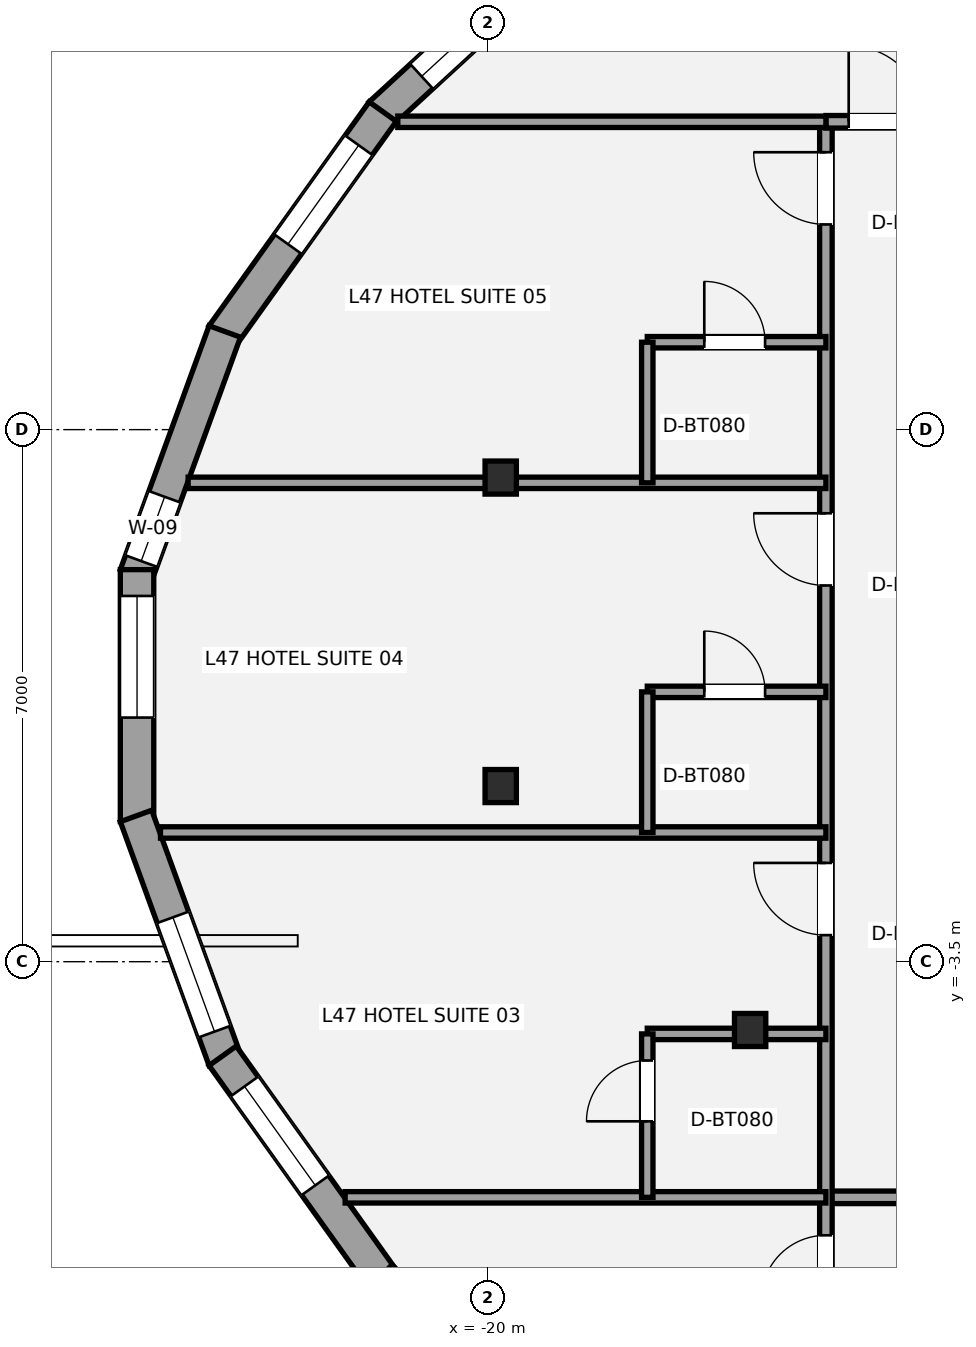
"""IFC4 building model, lengths in metres.
Left out: names, types, materials, properties, quantities, classifications, styles, units other than length and angle.
Written with IfcOpenShell. Run it as: python <this file> out.ifc"""

import sys

from ifc_helpers import new_model, si_unit, direction, frame, frame_2d, origin, origin_2d, place, context, subcontext, project, spatial, rectangle, i_section, extrude, element, fill, save


model = new_model("IFC4")
c1 = context("Model", 3, precision=1e-05, world=origin(), true_north=direction((0.0, 1.0)))
c2 = subcontext(c1, "Body", "Model", "MODEL_VIEW")
j1 = project(units=[si_unit("LENGTHUNIT", "METRE"), si_unit("PLANEANGLEUNIT", "RADIAN")], contexts=[c1])
p1 = place(None, origin())
s1 = spatial("IfcSite", under=j1, at=p1, CompositionType="ELEMENT")
p2 = place(p1, origin())
s2 = spatial("IfcBuilding", under=s1, at=p2, CompositionType="ELEMENT")
p3 = place(p2, frame((0.0, 0.0, 172.6)))
s3 = spatial("IfcBuildingStorey", under=s2, at=p3, CompositionType="ELEMENT", Elevation=172.6)
for number, where, z_axis, x_axis in (
    (1, (-19.828, 2.869, 0.0), (0.0, 0.0, 1.0), (1.0, 0.0, 0.0)),
    (2, (-19.828, -1.189, 0.0), (0.0, 0.0, 1.0), (1.0, 0.0, 0.0)),
    (3, (-16.547, -4.398, 0.0), (0.0, 0.0, 1.0), (1.0, 0.0, 0.0)),
):
    element("IfcColumn", number, at=place(p3, frame(where, z_axis=z_axis, x_axis=x_axis)), inside=s3, PredefinedType="COLUMN", context=c2, shape_type="SweptSolid", body=[
        extrude(i_section(OverallWidth=0.412, OverallDepth=0.435, WebThickness=0.036, FlangeThickness=0.057, at=origin_2d()), origin(), (0.0, 0.0, 1.0), 3.2),
    ])
p4 = place(p3, frame((-21.41, 7.65, 0.0), z_axis=(0.0, 0.0, 1.0), x_axis=(0.736282263947, 0.676674536093, 0.0)))
e4 = element("IfcWall", 4, at=p4, inside=s3, PredefinedType="STANDARD", context=c2, shape_type="SweptSolid", body=[
    extrude(rectangle(XDim=3.85, YDim=0.44, at=frame_2d((1.925, 0.0))), origin(), (0.0, 0.0, 1.0), 2.315),
])
p5 = place(p4, frame((0.736, 0.0, 0.58)))
e5 = element("IfcOpeningElement", 5, at=p5, cuts=e4, PredefinedType="OPENING", context=c2, shape_type="SweptSolid", body=[
    extrude(rectangle(XDim=1.6, YDim=1.55, at=frame_2d((0.8, 0.775))), frame((0.0, 0.23, 0.0), z_axis=(0.0, -1.0, 0.0), x_axis=(1.0, 0.0, 0.0)), (0.0, 0.0, 1.0), 0.46),
])
p6 = place(p3, frame((-23.487, 4.739, 0.0), z_axis=(0.0, 0.0, 1.0), x_axis=(0.581678195571, 0.813419004448, 0.0)))
e6 = element("IfcWall", 6, at=p6, inside=s3, PredefinedType="STANDARD", context=c2, shape_type="SweptSolid", body=[
    extrude(rectangle(XDim=3.621, YDim=0.44, at=frame_2d((1.811, 0.0))), origin(), (0.0, 0.0, 1.0), 2.315),
])
p7 = place(p6, frame((1.477, 0.0, 0.58)))
e7 = element("IfcOpeningElement", 7, at=p7, cuts=e6, PredefinedType="OPENING", context=c2, shape_type="SweptSolid", body=[
    extrude(rectangle(XDim=1.6, YDim=1.55, at=frame_2d((0.8, 0.775))), frame((0.0, 0.23, 0.0), z_axis=(0.0, -1.0, 0.0), x_axis=(1.0, 0.0, 0.0)), (0.0, 0.0, 1.0), 0.46),
])
p8 = place(p3, frame((-24.626, 1.583, 0.0), z_axis=(0.0, 0.0, 1.0), x_axis=(0.341938259916, 0.93972241987, 0.0)))
e8 = element("IfcWall", 8, at=p8, inside=s3, PredefinedType="STANDARD", context=c2, shape_type="SweptSolid", body=[
    extrude(rectangle(XDim=3.414, YDim=0.44, at=frame_2d((1.707, 0.0))), origin(), (0.0, 0.0, 1.0), 2.315),
])
p9 = place(p8, frame((0.2, 0.0, 0.58)))
e9 = element("IfcOpeningElement", 9, at=p9, cuts=e8, PredefinedType="OPENING", context=c2, shape_type="SweptSolid", body=[
    extrude(rectangle(XDim=0.9, YDim=1.35, at=frame_2d((0.45, 0.675))), frame((0.0, 0.23, 0.0), z_axis=(0.0, -1.0, 0.0), x_axis=(1.0, 0.0, 0.0)), (0.0, 0.0, 1.0), 0.46),
])
p10 = place(p3, frame((-24.613, -1.658, 0.0), z_axis=(0.0, 0.0, 1.0), x_axis=(0.0, 1.0, 0.0)))
e10 = element("IfcWall", 10, at=p10, inside=s3, PredefinedType="STANDARD", context=c2, shape_type="SweptSolid", body=[
    extrude(rectangle(XDim=3.316, YDim=0.44, at=frame_2d((1.658, 0.0))), origin(), (0.0, 0.0, 1.0), 2.315),
])
p11 = place(p10, frame((1.37, 0.0, 0.58)))
e11 = element("IfcOpeningElement", 11, at=p11, cuts=e10, PredefinedType="OPENING", context=c2, shape_type="SweptSolid", body=[
    extrude(rectangle(XDim=1.6, YDim=1.55, at=frame_2d((0.8, 0.775))), frame((0.0, 0.23, 0.0), z_axis=(0.0, -1.0, 0.0), x_axis=(1.0, 0.0, 0.0)), (0.0, 0.0, 1.0), 0.46),
])
p12 = place(p3, frame((-23.459, -4.791, 0.0), z_axis=(0.0, 0.0, 1.0), x_axis=(-0.341938259916, 0.93972241987, 0.0)))
e12 = element("IfcWall", 12, at=p12, inside=s3, PredefinedType="STANDARD", context=c2, shape_type="SweptSolid", body=[
    extrude(rectangle(XDim=3.414, YDim=0.44, at=frame_2d((1.707, 0.0))), origin(), (0.0, 0.0, 1.0), 2.315),
])
p13 = place(p12, frame((0.395, 0.0, 0.58)))
e13 = element("IfcOpeningElement", 13, at=p13, cuts=e12, PredefinedType="OPENING", context=c2, shape_type="SweptSolid", body=[
    extrude(rectangle(XDim=1.6, YDim=1.55, at=frame_2d((0.8, 0.775))), frame((0.0, 0.23, 0.0), z_axis=(0.0, -1.0, 0.0), x_axis=(1.0, 0.0, 0.0)), (0.0, 0.0, 1.0), 0.46),
])
p14 = place(p3, frame((-21.38, -7.684, 0.0), z_axis=(0.0, 0.0, 1.0), x_axis=(-0.581678195571, 0.813419004448, 0.0)))
e14 = element("IfcWall", 14, at=p14, inside=s3, PredefinedType="STANDARD", context=c2, shape_type="SweptSolid", body=[
    extrude(rectangle(XDim=3.621, YDim=0.44, at=frame_2d((1.811, 0.0))), origin(), (0.0, 0.0, 1.0), 2.315),
])
p15 = place(p14, frame((1.526, 0.0, 0.58)))
e15 = element("IfcOpeningElement", 15, at=p15, cuts=e14, PredefinedType="OPENING", context=c2, shape_type="SweptSolid", body=[
    extrude(rectangle(XDim=1.6, YDim=1.55, at=frame_2d((0.8, 0.775))), frame((0.0, 0.23, 0.0), z_axis=(0.0, -1.0, 0.0), x_axis=(1.0, 0.0, 0.0)), (0.0, 0.0, 1.0), 0.46),
])
p16 = place(p3, frame((-18.576, -10.255, 0.0), z_axis=(0.0, 0.0, 1.0), x_axis=(-0.736282263947, 0.676674536093, 0.0)))
e16 = element("IfcWall", 16, at=p16, inside=s3, PredefinedType="STANDARD", context=c2, shape_type="SweptSolid", body=[
    extrude(rectangle(XDim=3.85, YDim=0.44, at=frame_2d((1.925, 0.0))), origin(), (0.0, 0.0, 1.0), 2.315),
])
p17 = place(p16, frame((0.687, 0.0, 0.58)))
e17 = element("IfcOpeningElement", 17, at=p17, cuts=e16, PredefinedType="OPENING", context=c2, shape_type="SweptSolid", body=[
    extrude(rectangle(XDim=1.6, YDim=1.55, at=frame_2d((0.8, 0.775))), frame((0.0, 0.23, 0.0), z_axis=(0.0, -1.0, 0.0), x_axis=(1.0, 0.0, 0.0)), (0.0, 0.0, 1.0), 0.46),
])
p18 = place(p3, frame((-15.55, -6.6, 0.0), z_axis=(0.0, 0.0, 1.0), x_axis=(1.0, 0.0, 0.0)))
e18 = element("IfcWall", 18, at=p18, inside=s3, PredefinedType="PARTITIONING", context=c2, shape_type="SweptSolid", body=[
    extrude(rectangle(XDim=31.65, YDim=0.165, at=frame_2d((15.825, 0.0))), origin(), (0.0, 0.0, 1.0), 2.398),
])
p19 = place(p18, frame((14.7, 0.0, 0.0)))
e19 = element("IfcOpeningElement", 19, at=p19, cuts=e18, PredefinedType="OPENING", context=c2, shape_type="SweptSolid", body=[
    extrude(rectangle(XDim=0.95, YDim=2.15, at=frame_2d((0.475, 1.075))), frame((0.0, 0.093, 0.0), z_axis=(0.0, -1.0, 0.0), x_axis=(1.0, 0.0, 0.0)), (0.0, 0.0, 1.0), 0.185),
])
p20 = place(p18, frame((30.3, 0.0, 0.0)))
e20 = element("IfcOpeningElement", 20, at=p20, cuts=e18, PredefinedType="OPENING", context=c2, shape_type="SweptSolid", body=[
    extrude(rectangle(XDim=0.95, YDim=2.15, at=frame_2d((0.475, 1.075))), frame((0.0, 0.093, 0.0), z_axis=(0.0, -1.0, 0.0), x_axis=(1.0, 0.0, 0.0)), (0.0, 0.0, 1.0), 0.185),
])
p21 = place(p3, frame((-15.55, -12.028, 0.0), z_axis=(0.0, 0.0, 1.0), x_axis=(0.0, 1.0, 0.0)))
e21 = element("IfcWall", 21, at=p21, inside=s3, PredefinedType="PARTITIONING", context=c2, shape_type="SweptSolid", body=[
    extrude(rectangle(XDim=19.578, YDim=0.165, at=frame_2d((9.789, 0.0))), origin(), (0.0, 0.0, 1.0), 2.473),
])
p22 = place(p21, frame((4.079, 0.0, 0.0)))
e22 = element("IfcOpeningElement", 22, at=p22, cuts=e21, PredefinedType="OPENING", context=c2, shape_type="SweptSolid", body=[
    extrude(rectangle(XDim=0.85, YDim=2.1, at=frame_2d((0.425, 1.05))), frame((0.0, 0.093, 0.0), z_axis=(0.0, -1.0, 0.0), x_axis=(1.0, 0.0, 0.0)), (0.0, 0.0, 1.0), 0.185),
])
p23 = place(p21, frame((8.878, 0.0, 0.0)))
e23 = element("IfcOpeningElement", 23, at=p23, cuts=e21, PredefinedType="OPENING", context=c2, shape_type="SweptSolid", body=[
    extrude(rectangle(XDim=0.95, YDim=2.15, at=frame_2d((0.475, 1.075))), frame((0.0, 0.093, 0.0), z_axis=(0.0, -1.0, 0.0), x_axis=(1.0, 0.0, 0.0)), (0.0, 0.0, 1.0), 0.185),
])
p24 = place(p21, frame((13.478, 0.0, 0.0)))
e24 = element("IfcOpeningElement", 24, at=p24, cuts=e21, PredefinedType="OPENING", context=c2, shape_type="SweptSolid", body=[
    extrude(rectangle(XDim=0.95, YDim=2.15, at=frame_2d((0.475, 1.075))), frame((0.0, 0.093, 0.0), z_axis=(0.0, -1.0, 0.0), x_axis=(1.0, 0.0, 0.0)), (0.0, 0.0, 1.0), 0.185),
])
p25 = place(p21, frame((18.228, 0.0, 0.0)))
e25 = element("IfcOpeningElement", 25, at=p25, cuts=e21, PredefinedType="OPENING", context=c2, shape_type="SweptSolid", body=[
    extrude(rectangle(XDim=0.95, YDim=2.15, at=frame_2d((0.475, 1.075))), frame((0.0, 0.093, 0.0), z_axis=(0.0, -1.0, 0.0), x_axis=(1.0, 0.0, 0.0)), (0.0, 0.0, 1.0), 0.185),
])
p26 = place(p3, frame((-15.55, 7.55, 0.0), z_axis=(0.0, 0.0, 1.0), x_axis=(1.0, 0.0, 0.0)))
e26 = element("IfcWall", 26, at=p26, inside=s3, PredefinedType="PARTITIONING", context=c2, shape_type="SweptSolid", body=[
    extrude(rectangle(XDim=1.75, YDim=0.165, at=frame_2d((0.875, 0.0))), origin(), (0.0, 0.0, 1.0), 3.02),
])
p27 = place(p26, frame((0.3, 0.0, 0.0)))
e27 = element("IfcOpeningElement", 27, at=p27, cuts=e26, PredefinedType="OPENING", context=c2, shape_type="SweptSolid", body=[
    extrude(rectangle(XDim=1.0, YDim=2.15, at=frame_2d((0.5, 1.075))), frame((0.0, 0.093, 0.0), z_axis=(0.0, -1.0, 0.0), x_axis=(1.0, 0.0, 0.0)), (0.0, 0.0, 1.0), 0.185),
])
p28 = place(p3, frame((-21.182, 7.55, 0.0), z_axis=(0.0, 0.0, 1.0), x_axis=(1.0, 0.0, 0.0)))
e28 = element("IfcWall", 28, at=p28, inside=s3, PredefinedType="PLUMBINGWALL", context=c2, shape_type="SweptSolid", body=[
    extrude(rectangle(XDim=5.632, YDim=0.15, at=frame_2d((2.816, 0.0))), origin(), (0.0, 0.0, 1.0), 2.473),
])
p29 = place(p3, frame((-21.875, -6.6, 0.0), z_axis=(0.0, 0.0, 1.0), x_axis=(1.0, 0.0, 0.0)))
e29 = element("IfcWall", 29, at=p29, inside=s3, PredefinedType="PLUMBINGWALL", context=c2, shape_type="SweptSolid", body=[
    extrude(rectangle(XDim=6.325, YDim=0.15, at=frame_2d((3.163, 0.0))), origin(), (0.0, 0.0, 1.0), 2.473),
])
p30 = place(p3, frame((-24.305, -1.8, 0.0), z_axis=(0.0, 0.0, 1.0), x_axis=(1.0, 0.0, 0.0)))
e30 = element("IfcWall", 30, at=p30, inside=s3, PredefinedType="PLUMBINGWALL", context=c2, shape_type="SweptSolid", body=[
    extrude(rectangle(XDim=8.755, YDim=0.15, at=frame_2d((4.377, 0.0))), origin(), (0.0, 0.0, 1.0), 2.398),
])
p31 = place(p3, frame((-23.941, 2.8, 0.0), z_axis=(0.0, 0.0, 1.0), x_axis=(1.0, 0.0, 0.0)))
e31 = element("IfcWall", 31, at=p31, inside=s3, PredefinedType="PLUMBINGWALL", context=c2, shape_type="SweptSolid", body=[
    extrude(rectangle(XDim=8.391, YDim=0.15, at=frame_2d((4.195, 0.0))), origin(), (0.0, 0.0, 1.0), 2.473),
])
p32 = place(p3, frame((-17.9, -4.45, 0.0), z_axis=(0.0, 0.0, 1.0), x_axis=(1.0, 0.0, 0.0)))
e32 = element("IfcWall", 32, at=p32, inside=s3, PredefinedType="PLUMBINGWALL", context=c2, shape_type="SweptSolid", body=[
    extrude(rectangle(XDim=2.35, YDim=0.15, at=frame_2d((1.175, 0.0))), origin(), (0.0, 0.0, 1.0), 2.398),
])
p33 = place(p3, frame((-17.9, -6.6, 0.0), z_axis=(0.0, 0.0, 1.0), x_axis=(0.0, 1.0, 0.0)))
e33 = element("IfcWall", 33, at=p33, inside=s3, PredefinedType="PLUMBINGWALL", context=c2, shape_type="SweptSolid", body=[
    extrude(rectangle(XDim=2.15, YDim=0.15, at=frame_2d((1.075, 0.0))), origin(), (0.0, 0.0, 1.0), 2.473),
])
p34 = place(p33, frame((1.0, 0.0, 0.0)))
e34 = element("IfcOpeningElement", 34, at=p34, cuts=e33, PredefinedType="OPENING", context=c2, shape_type="SweptSolid", body=[
    extrude(rectangle(XDim=0.8, YDim=2.1, at=frame_2d((0.4, 1.05))), frame((0.0, 0.085, 0.0), z_axis=(0.0, -1.0, 0.0), x_axis=(1.0, 0.0, 0.0)), (0.0, 0.0, 1.0), 0.17),
])
p35 = place(p3, frame((-17.9, 0.05, 0.0), z_axis=(0.0, 0.0, 1.0), x_axis=(1.0, 0.0, 0.0)))
e35 = element("IfcWall", 35, at=p35, inside=s3, PredefinedType="PLUMBINGWALL", context=c2, shape_type="SweptSolid", body=[
    extrude(rectangle(XDim=2.35, YDim=0.15, at=frame_2d((1.175, 0.0))), origin(), (0.0, 0.0, 1.0), 2.473),
])
p36 = place(p35, frame((0.75, 0.0, 0.0)))
e36 = element("IfcOpeningElement", 36, at=p36, cuts=e35, PredefinedType="OPENING", context=c2, shape_type="SweptSolid", body=[
    extrude(rectangle(XDim=0.8, YDim=2.1, at=frame_2d((0.4, 1.05))), frame((0.0, 0.085, 0.0), z_axis=(0.0, -1.0, 0.0), x_axis=(1.0, 0.0, 0.0)), (0.0, 0.0, 1.0), 0.17),
])
p37 = place(p3, frame((-17.9, -1.8, 0.0), z_axis=(0.0, 0.0, 1.0), x_axis=(0.0, 1.0, 0.0)))
e37 = element("IfcWall", 37, at=p37, inside=s3, PredefinedType="PLUMBINGWALL", context=c2, shape_type="SweptSolid", body=[
    extrude(rectangle(XDim=1.85, YDim=0.15, at=frame_2d((0.925, 0.0))), origin(), (0.0, 0.0, 1.0), 3.02),
])
p38 = place(p3, frame((-17.9, 4.65, 0.0), z_axis=(0.0, 0.0, 1.0), x_axis=(1.0, 0.0, 0.0)))
e38 = element("IfcWall", 38, at=p38, inside=s3, PredefinedType="PLUMBINGWALL", context=c2, shape_type="SweptSolid", body=[
    extrude(rectangle(XDim=2.35, YDim=0.15, at=frame_2d((1.175, 0.0))), origin(), (0.0, 0.0, 1.0), 2.473),
])
p39 = place(p38, frame((0.75, 0.0, 0.0)))
e39 = element("IfcOpeningElement", 39, at=p39, cuts=e38, PredefinedType="OPENING", context=c2, shape_type="SweptSolid", body=[
    extrude(rectangle(XDim=0.8, YDim=2.1, at=frame_2d((0.4, 1.05))), frame((0.0, 0.085, 0.0), z_axis=(0.0, -1.0, 0.0), x_axis=(1.0, 0.0, 0.0)), (0.0, 0.0, 1.0), 0.17),
])
p40 = place(p3, frame((-17.9, 2.8, 0.0), z_axis=(0.0, 0.0, 1.0), x_axis=(0.0, 1.0, 0.0)))
e40 = element("IfcWall", 40, at=p40, inside=s3, PredefinedType="PLUMBINGWALL", context=c2, shape_type="SweptSolid", body=[
    extrude(rectangle(XDim=1.85, YDim=0.15, at=frame_2d((0.925, 0.0))), origin(), (0.0, 0.0, 1.0), 2.473),
])
p41 = place(p5, origin())
e41 = element("IfcWindow", 41, at=p41, inside=s3, PartitioningType="SINGLE_PANEL", PredefinedType="WINDOW", context=c2, shape_type="SweptSolid", body=[
    extrude(rectangle(XDim=1.6, YDim=1.55, at=frame_2d((0.8, 0.775))), frame((0.0, -0.01, 0.0), z_axis=(0.0, -1.0, 0.0), x_axis=(1.0, 0.0, 0.0)), (0.0, 0.0, 1.0), 0.06),
])
fill(e5, e41)
p42 = place(p7, origin())
e42 = element("IfcWindow", 42, at=p42, inside=s3, PartitioningType="SINGLE_PANEL", PredefinedType="WINDOW", context=c2, shape_type="SweptSolid", body=[
    extrude(rectangle(XDim=1.6, YDim=1.55, at=frame_2d((0.8, 0.775))), frame((0.0, -0.01, 0.0), z_axis=(0.0, -1.0, 0.0), x_axis=(1.0, 0.0, 0.0)), (0.0, 0.0, 1.0), 0.06),
])
fill(e7, e42)
p43 = place(p9, origin())
e43 = element("IfcWindow", 43, at=p43, inside=s3, PartitioningType="SINGLE_PANEL", PredefinedType="WINDOW", context=c2, shape_type="SweptSolid", body=[
    extrude(rectangle(XDim=0.9, YDim=1.35, at=frame_2d((0.45, 0.675))), frame((0.0, -0.01, 0.0), z_axis=(0.0, -1.0, 0.0), x_axis=(1.0, 0.0, 0.0)), (0.0, 0.0, 1.0), 0.06),
])
fill(e9, e43)
p44 = place(p11, origin())
e44 = element("IfcWindow", 44, at=p44, inside=s3, PartitioningType="SINGLE_PANEL", PredefinedType="WINDOW", context=c2, shape_type="SweptSolid", body=[
    extrude(rectangle(XDim=1.6, YDim=1.55, at=frame_2d((0.8, 0.775))), frame((0.0, -0.01, 0.0), z_axis=(0.0, -1.0, 0.0), x_axis=(1.0, 0.0, 0.0)), (0.0, 0.0, 1.0), 0.06),
])
fill(e11, e44)
p45 = place(p13, origin())
e45 = element("IfcWindow", 45, at=p45, inside=s3, PartitioningType="SINGLE_PANEL", PredefinedType="WINDOW", context=c2, shape_type="SweptSolid", body=[
    extrude(rectangle(XDim=1.6, YDim=1.55, at=frame_2d((0.8, 0.775))), frame((0.0, -0.01, 0.0), z_axis=(0.0, -1.0, 0.0), x_axis=(1.0, 0.0, 0.0)), (0.0, 0.0, 1.0), 0.06),
])
fill(e13, e45)
p46 = place(p15, origin())
e46 = element("IfcWindow", 46, at=p46, inside=s3, PartitioningType="SINGLE_PANEL", PredefinedType="WINDOW", context=c2, shape_type="SweptSolid", body=[
    extrude(rectangle(XDim=1.6, YDim=1.55, at=frame_2d((0.8, 0.775))), frame((0.0, -0.01, 0.0), z_axis=(0.0, -1.0, 0.0), x_axis=(1.0, 0.0, 0.0)), (0.0, 0.0, 1.0), 0.06),
])
fill(e15, e46)
p47 = place(p27, origin())
e47 = element("IfcDoor", 47, at=p47, inside=s3, OperationType="SINGLE_SWING_LEFT", PredefinedType="DOOR", context=c2, shape_type="SweptSolid", body=[
    extrude(rectangle(XDim=1.0, YDim=2.15, at=frame_2d((0.5, 1.075))), frame((0.0, 0.025, 0.0), z_axis=(0.0, -1.0, 0.0), x_axis=(1.0, 0.0, 0.0)), (0.0, 0.0, 1.0), 0.05),
])
fill(e27, e47)
p48 = place(p22, origin())
e48 = element("IfcDoor", 48, at=p48, inside=s3, OperationType="SINGLE_SWING_LEFT", PredefinedType="DOOR", context=c2, shape_type="SweptSolid", body=[
    extrude(rectangle(XDim=0.85, YDim=2.1, at=frame_2d((0.425, 1.05))), frame((0.0, 0.025, 0.0), z_axis=(0.0, -1.0, 0.0), x_axis=(1.0, 0.0, 0.0)), (0.0, 0.0, 1.0), 0.05),
])
fill(e22, e48)
p49 = place(p23, origin())
e49 = element("IfcDoor", 49, at=p49, inside=s3, OperationType="SINGLE_SWING_RIGHT", PredefinedType="DOOR", context=c2, shape_type="SweptSolid", body=[
    extrude(rectangle(XDim=0.95, YDim=2.15, at=frame_2d((0.475, 1.075))), frame((0.0, 0.025, 0.0), z_axis=(0.0, -1.0, 0.0), x_axis=(1.0, 0.0, 0.0)), (0.0, 0.0, 1.0), 0.05),
])
fill(e23, e49)
p50 = place(p34, origin())
e50 = element("IfcDoor", 50, at=p50, inside=s3, OperationType="SINGLE_SWING_LEFT", PredefinedType="DOOR", context=c2, shape_type="SweptSolid", body=[
    extrude(rectangle(XDim=0.8, YDim=2.1, at=frame_2d((0.4, 1.05))), frame((0.0, 0.025, 0.0), z_axis=(0.0, -1.0, 0.0), x_axis=(1.0, 0.0, 0.0)), (0.0, 0.0, 1.0), 0.05),
])
fill(e34, e50)
p51 = place(p24, origin())
e51 = element("IfcDoor", 51, at=p51, inside=s3, OperationType="SINGLE_SWING_RIGHT", PredefinedType="DOOR", context=c2, shape_type="SweptSolid", body=[
    extrude(rectangle(XDim=0.95, YDim=2.15, at=frame_2d((0.475, 1.075))), frame((0.0, 0.025, 0.0), z_axis=(0.0, -1.0, 0.0), x_axis=(1.0, 0.0, 0.0)), (0.0, 0.0, 1.0), 0.05),
])
fill(e24, e51)
p52 = place(p36, origin())
e52 = element("IfcDoor", 52, at=p52, inside=s3, OperationType="SINGLE_SWING_LEFT", PredefinedType="DOOR", context=c2, shape_type="SweptSolid", body=[
    extrude(rectangle(XDim=0.8, YDim=2.1, at=frame_2d((0.4, 1.05))), frame((0.0, 0.025, 0.0), z_axis=(0.0, -1.0, 0.0), x_axis=(1.0, 0.0, 0.0)), (0.0, 0.0, 1.0), 0.05),
])
fill(e36, e52)
p53 = place(p25, origin())
e53 = element("IfcDoor", 53, at=p53, inside=s3, OperationType="SINGLE_SWING_RIGHT", PredefinedType="DOOR", context=c2, shape_type="SweptSolid", body=[
    extrude(rectangle(XDim=0.95, YDim=2.15, at=frame_2d((0.475, 1.075))), frame((0.0, 0.025, 0.0), z_axis=(0.0, -1.0, 0.0), x_axis=(1.0, 0.0, 0.0)), (0.0, 0.0, 1.0), 0.05),
])
fill(e25, e53)
p54 = place(p39, origin())
e54 = element("IfcDoor", 54, at=p54, inside=s3, OperationType="SINGLE_SWING_LEFT", PredefinedType="DOOR", context=c2, shape_type="SweptSolid", body=[
    extrude(rectangle(XDim=0.8, YDim=2.1, at=frame_2d((0.4, 1.05))), frame((0.0, 0.025, 0.0), z_axis=(0.0, -1.0, 0.0), x_axis=(1.0, 0.0, 0.0)), (0.0, 0.0, 1.0), 0.05),
])
fill(e39, e54)
save(model, sys.argv[1])
